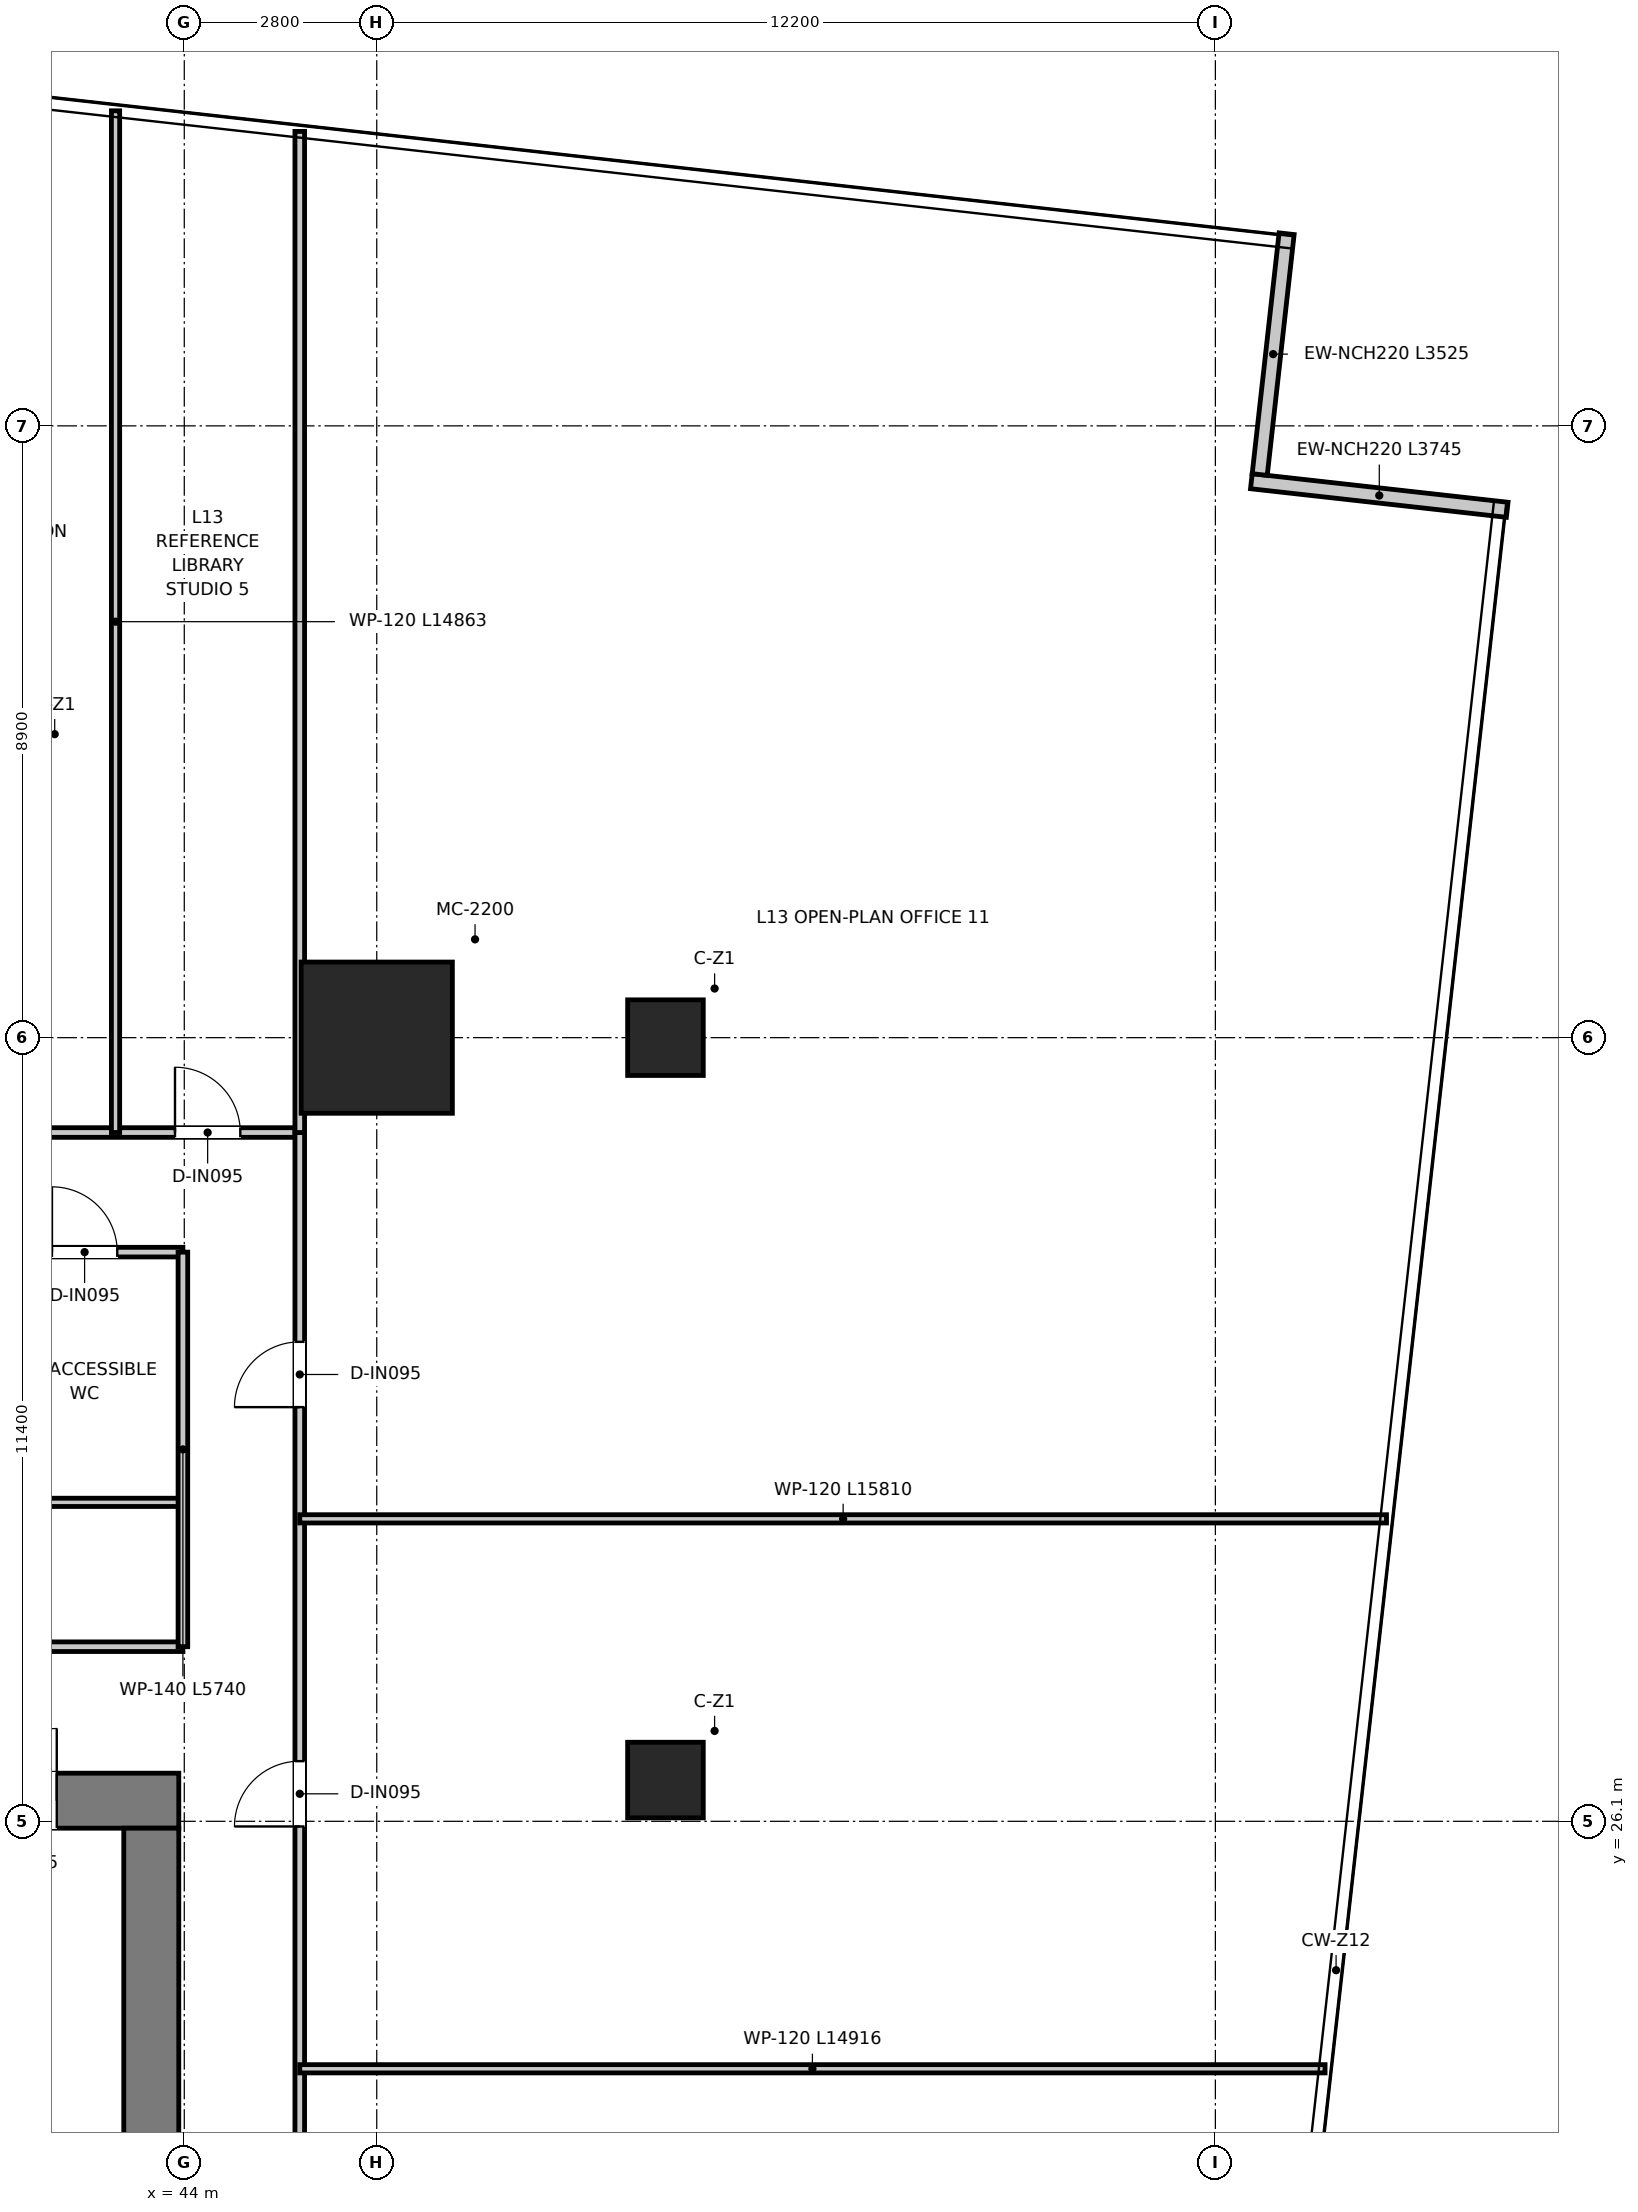
"""IFC4 building model, lengths in metres.
Left out: names, types, materials, properties, quantities, classifications, styles, units other than length and angle.
Written with IfcOpenShell. Run it as: python <this file> out.ifc"""

import sys

from ifc_helpers import new_model, si_unit, direction, frame, frame_2d, origin, origin_2d, place, context, subcontext, project, spatial, rectangle, extrude, source, transform, mapped, element, fill, save


model = new_model("IFC4")
c1 = context("Model", 3, precision=1e-05, world=origin(), true_north=direction((0.0, 1.0)))
c2 = subcontext(c1, "Body", "Model", "MODEL_VIEW")
j1 = project(units=[si_unit("LENGTHUNIT", "METRE"), si_unit("PLANEANGLEUNIT", "RADIAN")], contexts=[c1])
p1 = place(None, origin())
s1 = spatial("IfcSite", under=j1, at=p1, CompositionType="ELEMENT")
p2 = place(p1, origin())
s2 = spatial("IfcBuilding", under=s1, at=p2, CompositionType="ELEMENT")
p3 = place(p2, frame((0.0, 0.0, 56.6)))
s3 = spatial("IfcBuildingStorey", under=s2, at=p3, CompositionType="ELEMENT", Elevation=56.6)
p4 = place(p3, frame((28.08, 26.4, 0.0), z_axis=(0.0, 0.0, 1.0), x_axis=(1.0, 0.0, 0.0)))
e1 = element("IfcWall", 1, at=p4, inside=s3, PredefinedType="SHEAR", context=c2, shape_type="SweptSolid", body=[
    extrude(rectangle(XDim=15.84, YDim=0.8, at=frame_2d((7.92, 0.0))), origin(), (0.0, 0.0, 1.0), 3.95),
])
p5 = place(p4, frame((7.22, 0.0, 0.0)))
e2 = element("IfcOpeningElement", 2, at=p5, cuts=e1, PredefinedType="OPENING", context=c2, shape_type="SweptSolid", body=[
    extrude(rectangle(XDim=1.4, YDim=2.2, at=frame_2d((0.7, 1.1))), frame((0.0, 0.41, 0.0), z_axis=(0.0, -1.0, 0.0), x_axis=(1.0, 0.0, 0.0)), (0.0, 0.0, 1.0), 0.82),
])
p6 = place(p4, frame((1.775, 0.0, 0.0)))
e3 = element("IfcOpeningElement", 3, at=p6, cuts=e1, PredefinedType="OPENING", context=c2, shape_type="SweptSolid", body=[
    extrude(rectangle(XDim=1.05, YDim=2.1, at=frame_2d((0.525, 1.05))), frame((0.0, 0.41, 0.0), z_axis=(0.0, -1.0, 0.0), x_axis=(1.0, 0.0, 0.0)), (0.0, 0.0, 1.0), 0.82),
])
p7 = place(p4, frame((13.015, 0.0, 0.0)))
e4 = element("IfcOpeningElement", 4, at=p7, cuts=e1, PredefinedType="OPENING", context=c2, shape_type="SweptSolid", body=[
    extrude(rectangle(XDim=1.05, YDim=2.1, at=frame_2d((0.525, 1.05))), frame((0.0, 0.41, 0.0), z_axis=(0.0, -1.0, 0.0), x_axis=(1.0, 0.0, 0.0)), (0.0, 0.0, 1.0), 0.82),
])
p8 = place(p3, frame((43.52, 11.3, 0.0), z_axis=(0.0, 0.0, 1.0), x_axis=(0.0, 1.0, 0.0)))
e5 = element("IfcWall", 5, at=p8, inside=s3, PredefinedType="SHEAR", context=c2, shape_type="SweptSolid", body=[
    extrude(rectangle(XDim=14.7, YDim=0.8, at=frame_2d((7.35, 0.0))), origin(), (0.0, 0.0, 1.0), 3.95),
])
m1 = source(origin(), c2, "Body", "SweptSolid", [
    extrude(rectangle(XDim=2.2, YDim=2.2, at=origin_2d()), origin(), (0.0, 0.0, 1.0), 3.95),
])
p9 = place(p3, frame((46.8, 37.5, 0.0), z_axis=(0.0, 0.0, 1.0), x_axis=(1.0, 0.0, 0.0)))
e6 = element("IfcColumn", 6, at=p9, inside=s3, PredefinedType="USERDEFINED", context=c2, shape_type="MappedRepresentation", body=[
    mapped(m1, transform((0.0, 0.0, 0.0), x_axis=(1.0, 0.0, 0.0), y_axis=(0.0, 1.0, 0.0), z_axis=(0.0, 0.0, 1.0), scale=1.0)),
])
m2 = source(origin(), c2, "Body", "SweptSolid", [
    extrude(rectangle(XDim=1.1, YDim=1.1, at=origin_2d()), origin(), (0.0, 0.0, 1.0), 3.95),
])
for number, where, z_axis, x_axis in (
    (7, (51.0, 37.5, 0.0), (0.0, 0.0, 1.0), (1.0, 0.0, 0.0)),
    (8, (51.0, 26.7, 0.0), (0.0, 0.0, 1.0), (1.0, 0.0, 0.0)),
):
    element("IfcColumn", number, at=place(p3, frame(where, z_axis=z_axis, x_axis=x_axis)), inside=s3, PredefinedType="COLUMN", context=c2, shape_type="MappedRepresentation", body=[
        mapped(m2, transform((0.0, 0.0, 0.0), x_axis=(1.0, 0.0, 0.0), y_axis=(0.0, 1.0, 0.0), z_axis=(0.0, 0.0, 1.0), scale=1.0)),
    ])
p10 = place(p3, frame((63.245, 45.179, 0.0), z_axis=(0.0, 0.0, 1.0), x_axis=(-0.99381117716, 0.111082600583, 0.0)))
e9 = element("IfcWall", 9, at=p10, inside=s3, PredefinedType="ELEMENTEDWALL", context=c2, shape_type="SweptSolid", body=[
    extrude(rectangle(XDim=3.745, YDim=0.22, at=frame_2d((1.873, 0.0))), origin(), (0.0, 0.0, 1.0), 3.67),
])
p11 = place(p3, frame((59.645, 45.692, 0.0), z_axis=(0.0, 0.0, 1.0), x_axis=(0.111016801598, 0.993818529593, 0.0)))
e10 = element("IfcWall", 10, at=p11, inside=s3, PredefinedType="ELEMENTEDWALL", context=c2, shape_type="SweptSolid", body=[
    extrude(rectangle(XDim=3.525, YDim=0.22, at=frame_2d((1.763, 0.0))), origin(), (0.0, 0.0, 1.0), 3.67),
])
p12 = place(p3, frame((28.02, 28.64, 0.0), z_axis=(0.0, 0.0, 1.0), x_axis=(1.0, 0.0, 0.0)))
e11 = element("IfcWall", 11, at=p12, inside=s3, PredefinedType="PARTITIONING", context=c2, shape_type="SweptSolid", body=[
    extrude(rectangle(XDim=15.96, YDim=0.14, at=frame_2d((7.98, 0.0))), origin(), (0.0, 0.0, 1.0), 3.08),
])
p13 = place(p12, frame((7.455, 0.0, 0.0)))
e12 = element("IfcOpeningElement", 12, at=p13, cuts=e11, PredefinedType="OPENING", context=c2, shape_type="SweptSolid", body=[
    extrude(rectangle(XDim=1.05, YDim=2.15, at=frame_2d((0.525, 1.075))), frame((0.0, 0.08, 0.0), z_axis=(0.0, -1.0, 0.0), x_axis=(1.0, 0.0, 0.0)), (0.0, 0.0, 1.0), 0.16),
])
p14 = place(p3, frame((28.02, 30.74, 0.0), z_axis=(0.0, 0.0, 1.0), x_axis=(1.0, 0.0, 0.0)))
e13 = element("IfcWall", 13, at=p14, inside=s3, PredefinedType="PARTITIONING", context=c2, shape_type="SweptSolid", body=[
    extrude(rectangle(XDim=15.96, YDim=0.12, at=frame_2d((7.98, 0.0))), origin(), (0.0, 0.0, 1.0), 3.08),
])
p15 = place(p3, frame((28.02, 34.38, 0.0), z_axis=(0.0, 0.0, 1.0), x_axis=(1.0, 0.0, 0.0)))
e14 = element("IfcWall", 14, at=p15, inside=s3, PredefinedType="PARTITIONING", context=c2, shape_type="SweptSolid", body=[
    extrude(rectangle(XDim=15.96, YDim=0.14, at=frame_2d((7.98, 0.0))), origin(), (0.0, 0.0, 1.0), 3.08),
])
p16 = place(p15, frame((7.83, 0.0, 0.0)))
e15 = element("IfcOpeningElement", 15, at=p16, cuts=e14, PredefinedType="OPENING", context=c2, shape_type="SweptSolid", body=[
    extrude(rectangle(XDim=0.9, YDim=2.1, at=frame_2d((0.45, 1.05))), frame((0.0, 0.08, 0.0), z_axis=(0.0, -1.0, 0.0), x_axis=(1.0, 0.0, 0.0)), (0.0, 0.0, 1.0), 0.16),
])
p17 = place(p15, frame((11.03, 0.0, 0.0)))
e16 = element("IfcOpeningElement", 16, at=p17, cuts=e14, PredefinedType="OPENING", context=c2, shape_type="SweptSolid", body=[
    extrude(rectangle(XDim=0.9, YDim=2.1, at=frame_2d((0.45, 1.05))), frame((0.0, 0.08, 0.0), z_axis=(0.0, -1.0, 0.0), x_axis=(1.0, 0.0, 0.0)), (0.0, 0.0, 1.0), 0.16),
])
p18 = place(p15, frame((14.055, 0.0, 0.0)))
e17 = element("IfcOpeningElement", 17, at=p18, cuts=e14, PredefinedType="OPENING", context=c2, shape_type="SweptSolid", body=[
    extrude(rectangle(XDim=0.95, YDim=2.1, at=frame_2d((0.475, 1.05))), frame((0.0, 0.08, 0.0), z_axis=(0.0, -1.0, 0.0), x_axis=(1.0, 0.0, 0.0)), (0.0, 0.0, 1.0), 0.16),
])
p19 = place(p15, frame((2.855, 0.0, 0.0)))
e18 = element("IfcOpeningElement", 18, at=p19, cuts=e14, PredefinedType="OPENING", context=c2, shape_type="SweptSolid", body=[
    extrude(rectangle(XDim=0.95, YDim=2.1, at=frame_2d((0.475, 1.05))), frame((0.0, 0.08, 0.0), z_axis=(0.0, -1.0, 0.0), x_axis=(1.0, 0.0, 0.0)), (0.0, 0.0, 1.0), 0.16),
])
p20 = place(p3, frame((43.98, 28.64, 0.0), z_axis=(0.0, 0.0, 1.0), x_axis=(0.0, 1.0, 0.0)))
e19 = element("IfcWall", 19, at=p20, inside=s3, PredefinedType="PARTITIONING", context=c2, shape_type="SweptSolid", body=[
    extrude(rectangle(XDim=5.74, YDim=0.14, at=frame_2d((2.87, 0.0))), origin(), (0.0, 0.0, 1.0), 3.22),
])
p21 = place(p3, frame((26.32, 36.12, 0.0), z_axis=(0.0, 0.0, 1.0), x_axis=(1.0, 0.0, 0.0)))
e20 = element("IfcWall", 20, at=p21, inside=s3, PredefinedType="PARTITIONING", context=c2, shape_type="SweptSolid", body=[
    extrude(rectangle(XDim=19.36, YDim=0.14, at=frame_2d((9.68, 0.0))), origin(), (0.0, 0.0, 1.0), 3.08),
])
p22 = place(p21, frame((1.115, 0.0, 0.0)))
e21 = element("IfcOpeningElement", 21, at=p22, cuts=e20, PredefinedType="OPENING", context=c2, shape_type="SweptSolid", body=[
    extrude(rectangle(XDim=0.95, YDim=2.1, at=frame_2d((0.475, 1.05))), frame((0.0, 0.08, 0.0), z_axis=(0.0, -1.0, 0.0), x_axis=(1.0, 0.0, 0.0)), (0.0, 0.0, 1.0), 0.16),
])
p23 = place(p21, frame((4.955, 0.0, 0.0)))
e22 = element("IfcOpeningElement", 22, at=p23, cuts=e20, PredefinedType="OPENING", context=c2, shape_type="SweptSolid", body=[
    extrude(rectangle(XDim=0.95, YDim=2.1, at=frame_2d((0.475, 1.05))), frame((0.0, 0.08, 0.0), z_axis=(0.0, -1.0, 0.0), x_axis=(1.0, 0.0, 0.0)), (0.0, 0.0, 1.0), 0.16),
])
p24 = place(p21, frame((9.455, 0.0, 0.0)))
e23 = element("IfcOpeningElement", 23, at=p24, cuts=e20, PredefinedType="OPENING", context=c2, shape_type="SweptSolid", body=[
    extrude(rectangle(XDim=0.95, YDim=2.1, at=frame_2d((0.475, 1.05))), frame((0.0, 0.08, 0.0), z_axis=(0.0, -1.0, 0.0), x_axis=(1.0, 0.0, 0.0)), (0.0, 0.0, 1.0), 0.16),
])
p25 = place(p21, frame((13.955, 0.0, 0.0)))
e24 = element("IfcOpeningElement", 24, at=p25, cuts=e20, PredefinedType="OPENING", context=c2, shape_type="SweptSolid", body=[
    extrude(rectangle(XDim=0.95, YDim=2.1, at=frame_2d((0.475, 1.05))), frame((0.0, 0.08, 0.0), z_axis=(0.0, -1.0, 0.0), x_axis=(1.0, 0.0, 0.0)), (0.0, 0.0, 1.0), 0.16),
])
p26 = place(p21, frame((17.545, 0.0, 0.0)))
e25 = element("IfcOpeningElement", 25, at=p26, cuts=e20, PredefinedType="OPENING", context=c2, shape_type="SweptSolid", body=[
    extrude(rectangle(XDim=0.95, YDim=2.1, at=frame_2d((0.475, 1.05))), frame((0.0, 0.08, 0.0), z_axis=(0.0, -1.0, 0.0), x_axis=(1.0, 0.0, 0.0)), (0.0, 0.0, 1.0), 0.16),
])
p27 = place(p3, frame((45.68, 10.5, 0.0), z_axis=(0.0, 0.0, 1.0), x_axis=(0.0, 1.0, 0.0)))
e26 = element("IfcWall", 26, at=p27, inside=s3, PredefinedType="PARTITIONING", context=c2, shape_type="SweptSolid", body=[
    extrude(rectangle(XDim=25.62, YDim=0.14, at=frame_2d((12.81, 0.0))), origin(), (0.0, 0.0, 1.0), 2.97),
])
p28 = place(p27, frame((9.025, 0.0, 0.0)))
e27 = element("IfcOpeningElement", 27, at=p28, cuts=e26, PredefinedType="OPENING", context=c2, shape_type="SweptSolid", body=[
    extrude(rectangle(XDim=0.95, YDim=2.1, at=frame_2d((0.475, 1.05))), frame((0.0, 0.08, 0.0), z_axis=(0.0, -1.0, 0.0), x_axis=(1.0, 0.0, 0.0)), (0.0, 0.0, 1.0), 0.16),
])
p29 = place(p27, frame((15.525, 0.0, 0.0)))
e28 = element("IfcOpeningElement", 28, at=p29, cuts=e26, PredefinedType="OPENING", context=c2, shape_type="SweptSolid", body=[
    extrude(rectangle(XDim=0.95, YDim=2.1, at=frame_2d((0.475, 1.05))), frame((0.0, 0.08, 0.0), z_axis=(0.0, -1.0, 0.0), x_axis=(1.0, 0.0, 0.0)), (0.0, 0.0, 1.0), 0.16),
])
p30 = place(p27, frame((21.625, 0.0, 0.0)))
e29 = element("IfcOpeningElement", 29, at=p30, cuts=e26, PredefinedType="OPENING", context=c2, shape_type="SweptSolid", body=[
    extrude(rectangle(XDim=0.95, YDim=2.1, at=frame_2d((0.475, 1.05))), frame((0.0, 0.08, 0.0), z_axis=(0.0, -1.0, 0.0), x_axis=(1.0, 0.0, 0.0)), (0.0, 0.0, 1.0), 0.16),
])
p31 = place(p3, frame((45.68, 36.12, 0.0), z_axis=(0.0, 0.0, 1.0), x_axis=(0.0, 1.0, 0.0)))
e30 = element("IfcWall", 30, at=p31, inside=s3, PredefinedType="PARTITIONING", context=c2, shape_type="SweptSolid", body=[
    extrude(rectangle(XDim=14.563, YDim=0.14, at=frame_2d((7.282, 0.0))), origin(), (0.0, 0.0, 1.0), 2.97),
])
p32 = place(p3, frame((43.0, 36.12, 0.0), z_axis=(0.0, 0.0, 1.0), x_axis=(0.0, 1.0, 0.0)))
e31 = element("IfcWall", 31, at=p32, inside=s3, PredefinedType="PARTITIONING", context=c2, shape_type="SweptSolid", body=[
    extrude(rectangle(XDim=14.863, YDim=0.12, at=frame_2d((7.431, 0.0))), origin(), (0.0, 0.0, 1.0), 2.97),
])
p33 = place(p3, frame((45.68, 22.5, 0.0), z_axis=(0.0, 0.0, 1.0), x_axis=(1.0, 0.0, 0.0)))
e32 = element("IfcWall", 32, at=p33, inside=s3, PredefinedType="PARTITIONING", context=c2, shape_type="SweptSolid", body=[
    extrude(rectangle(XDim=14.916, YDim=0.12, at=frame_2d((7.458, 0.0))), origin(), (0.0, 0.0, 1.0), 2.97),
])
p34 = place(p3, frame((45.68, 30.5, 0.0), z_axis=(0.0, 0.0, 1.0), x_axis=(1.0, 0.0, 0.0)))
e33 = element("IfcWall", 33, at=p34, inside=s3, PredefinedType="PARTITIONING", context=c2, shape_type="SweptSolid", body=[
    extrude(rectangle(XDim=15.81, YDim=0.12, at=frame_2d((7.905, 0.0))), origin(), (0.0, 0.0, 1.0), 2.97),
])
p35 = place(p7, origin())
e34 = element("IfcDoor", 34, at=p35, inside=s3, OperationType="SINGLE_SWING_RIGHT", PredefinedType="DOOR", context=c2, shape_type="SweptSolid", body=[
    extrude(rectangle(XDim=1.05, YDim=2.1, at=frame_2d((0.525, 1.05))), frame((0.0, 0.025, 0.0), z_axis=(0.0, -1.0, 0.0), x_axis=(1.0, 0.0, 0.0)), (0.0, 0.0, 1.0), 0.05),
])
fill(e4, e34)
p36 = place(p18, origin())
e35 = element("IfcDoor", 35, at=p36, inside=s3, OperationType="SINGLE_SWING_LEFT", PredefinedType="DOOR", context=c2, shape_type="SweptSolid", body=[
    extrude(rectangle(XDim=0.95, YDim=2.1, at=frame_2d((0.475, 1.05))), frame((0.0, 0.025, 0.0), z_axis=(0.0, -1.0, 0.0), x_axis=(1.0, 0.0, 0.0)), (0.0, 0.0, 1.0), 0.05),
])
fill(e17, e35)
p37 = place(p26, origin())
e36 = element("IfcDoor", 36, at=p37, inside=s3, OperationType="SINGLE_SWING_LEFT", PredefinedType="DOOR", context=c2, shape_type="SweptSolid", body=[
    extrude(rectangle(XDim=0.95, YDim=2.1, at=frame_2d((0.475, 1.05))), frame((0.0, 0.025, 0.0), z_axis=(0.0, -1.0, 0.0), x_axis=(1.0, 0.0, 0.0)), (0.0, 0.0, 1.0), 0.05),
])
fill(e25, e36)
p38 = place(p29, origin())
e37 = element("IfcDoor", 37, at=p38, inside=s3, OperationType="SINGLE_SWING_LEFT", PredefinedType="DOOR", context=c2, shape_type="SweptSolid", body=[
    extrude(rectangle(XDim=0.95, YDim=2.1, at=frame_2d((0.475, 1.05))), frame((0.0, 0.025, 0.0), z_axis=(0.0, -1.0, 0.0), x_axis=(1.0, 0.0, 0.0)), (0.0, 0.0, 1.0), 0.05),
])
fill(e28, e37)
p39 = place(p30, origin())
e38 = element("IfcDoor", 38, at=p39, inside=s3, OperationType="SINGLE_SWING_LEFT", PredefinedType="DOOR", context=c2, shape_type="SweptSolid", body=[
    extrude(rectangle(XDim=0.95, YDim=2.1, at=frame_2d((0.475, 1.05))), frame((0.0, 0.025, 0.0), z_axis=(0.0, -1.0, 0.0), x_axis=(1.0, 0.0, 0.0)), (0.0, 0.0, 1.0), 0.05),
])
fill(e29, e38)
save(model, sys.argv[1])
